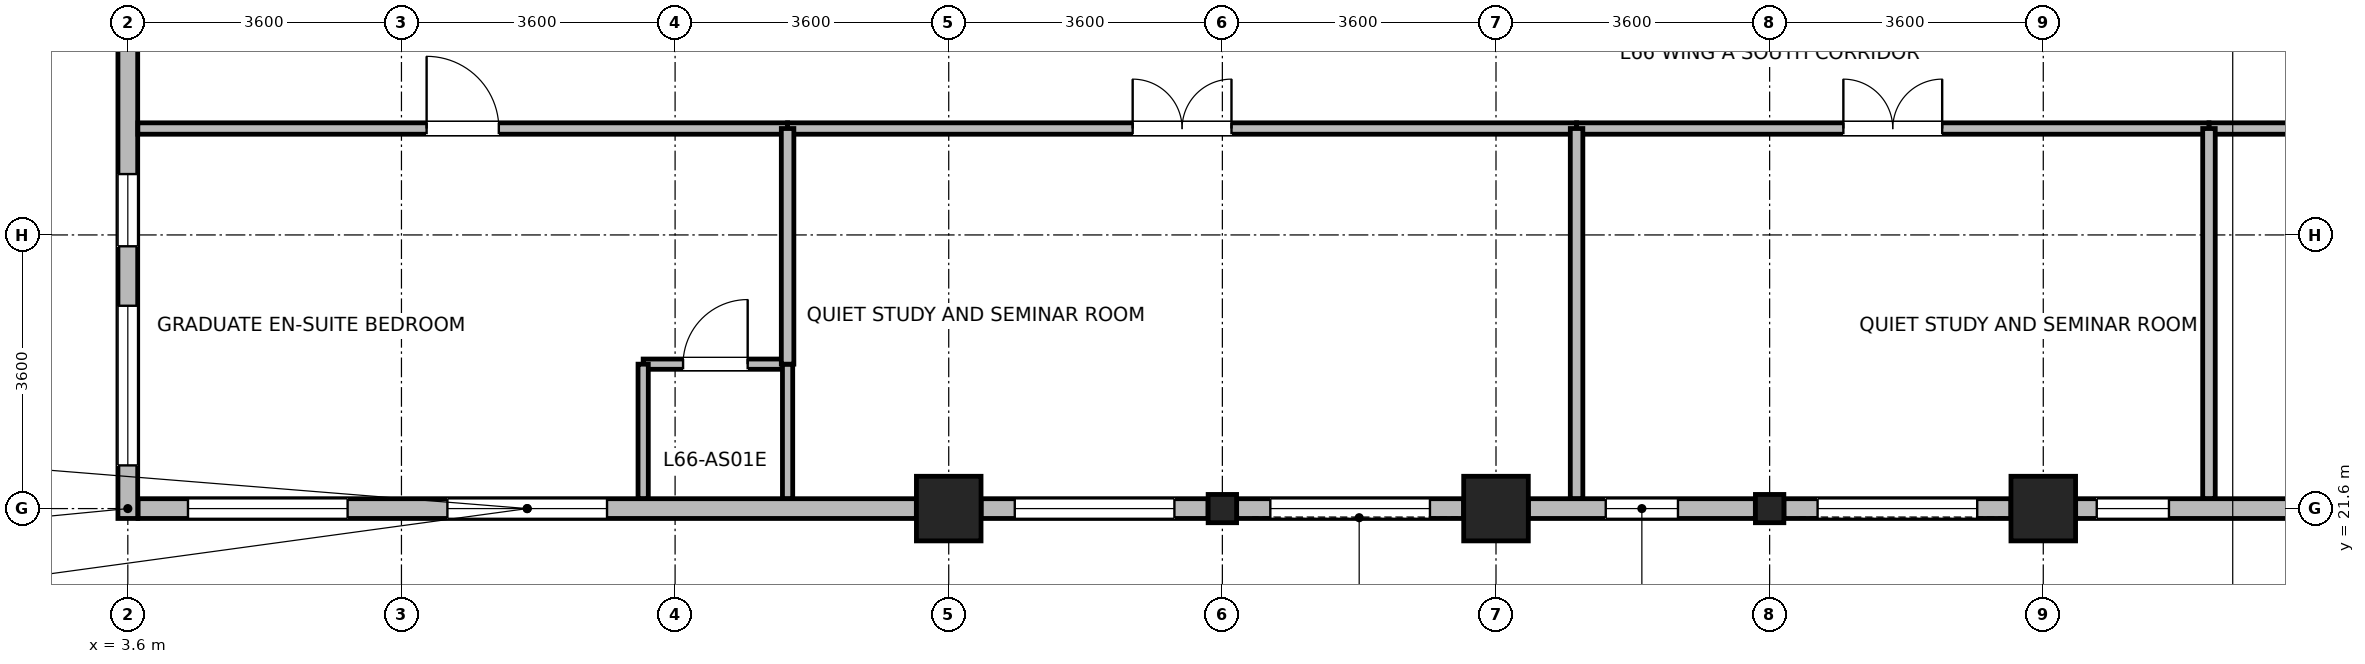
"""IFC4 building model, lengths in metres.
Left out: names, types, materials, properties, quantities, classifications, styles, units other than length and angle.
Written with IfcOpenShell. Run it as: python <this file> out.ifc"""

import sys

from ifc_helpers import new_model, si_unit, direction, frame, frame_2d, origin, origin_2d, place, context, subcontext, project, spatial, rectangle, i_section, extrude, source, transform, mapped, element, fill, save


model = new_model("IFC4")
c1 = context("Model", 3, precision=1e-05, world=origin(), true_north=direction((0.0, 1.0)))
c2 = subcontext(c1, "Body", "Model", "MODEL_VIEW")
j1 = project(units=[si_unit("LENGTHUNIT", "METRE"), si_unit("PLANEANGLEUNIT", "RADIAN")], contexts=[c1])
p1 = place(None, origin())
s1 = spatial("IfcSite", under=j1, at=p1, CompositionType="ELEMENT")
p2 = place(p1, origin())
s2 = spatial("IfcBuilding", under=s1, at=p2, CompositionType="ELEMENT")
p3 = place(p2, frame((0.0, 0.0, 257.3)))
s3 = spatial("IfcBuildingStorey", under=s2, at=p3, CompositionType="ELEMENT", Elevation=257.3)
m1 = source(origin(), c2, "Body", "SweptSolid", [
    extrude(rectangle(XDim=0.85, YDim=0.85, at=origin_2d()), origin(), (0.0, 0.0, 1.0), 3.7),
])
for number, where, z_axis, x_axis in (
    (1, (14.4, 21.6, 0.0), (0.0, 0.0, 1.0), (1.0, 0.0, 0.0)),
    (2, (21.6, 21.6, 0.0), (0.0, 0.0, 1.0), (1.0, 0.0, 0.0)),
    (3, (28.8, 21.6, 0.0), (0.0, 0.0, 1.0), (1.0, 0.0, 0.0)),
):
    element("IfcColumn", number, at=place(p3, frame(where, z_axis=z_axis, x_axis=x_axis)), inside=s3, PredefinedType="COLUMN", context=c2, shape_type="MappedRepresentation", body=[
        mapped(m1, transform((0.0, 0.0, 0.0), x_axis=(1.0, 0.0, 0.0), y_axis=(0.0, 1.0, 0.0), z_axis=(0.0, 0.0, 1.0), scale=1.0)),
    ])
m2 = source(origin(), c2, "Body", "SweptSolid", [
    extrude(i_section(OverallWidth=0.374, OverallDepth=0.372, WebThickness=0.015, FlangeThickness=0.026, FilletRadius=0.015, at=origin_2d()), origin(), (0.0, 0.0, 1.0), 3.7),
])
for number, where, z_axis, x_axis in (
    (4, (18.0, 21.6, 0.0), (0.0, 0.0, 1.0), (1.0, 0.0, 0.0)),
    (5, (25.2, 21.6, 0.0), (0.0, 0.0, 1.0), (1.0, 0.0, 0.0)),
):
    element("IfcColumn", number, at=place(p3, frame(where, z_axis=z_axis, x_axis=x_axis)), inside=s3, PredefinedType="COLUMN", context=c2, shape_type="MappedRepresentation", body=[
        mapped(m2, transform((0.0, 0.0, 0.0), x_axis=(1.0, 0.0, 0.0), y_axis=(0.0, 1.0, 0.0), z_axis=(0.0, 0.0, 1.0), scale=1.0)),
    ])
p4 = place(p3, frame((13.974, 21.6, 0.0), z_axis=(0.0, 0.0, 1.0), x_axis=(-1.0, 0.0, 0.0)))
e6 = element("IfcWall", 6, at=p4, inside=s3, PredefinedType="STANDARD", context=c2, shape_type="SweptSolid", body=[
    extrude(rectangle(XDim=10.239, YDim=0.26, at=frame_2d((5.12, 0.0))), origin(), (0.0, 0.0, 1.0), 3.455),
])
p5 = place(p4, frame((4.07, 0.0, 0.85)))
e7 = element("IfcOpeningElement", 7, at=p5, cuts=e6, PredefinedType="OPENING", context=c2, shape_type="SweptSolid", body=[
    extrude(rectangle(XDim=2.1, YDim=1.95, at=frame_2d((1.05, 0.975))), frame((0.0, 0.14, 0.0), z_axis=(0.0, -1.0, 0.0), x_axis=(1.0, 0.0, 0.0)), (0.0, 0.0, 1.0), 0.28),
])
p6 = place(p4, frame((7.482, 0.0, 0.85)))
e8 = element("IfcOpeningElement", 8, at=p6, cuts=e6, PredefinedType="OPENING", context=c2, shape_type="SweptSolid", body=[
    extrude(rectangle(XDim=2.1, YDim=1.95, at=frame_2d((1.05, 0.975))), frame((0.0, 0.14, 0.0), z_axis=(0.0, -1.0, 0.0), x_axis=(1.0, 0.0, 0.0)), (0.0, 0.0, 1.0), 0.28),
])
p7 = place(p3, frame((17.812, 21.6, 0.0), z_axis=(0.0, 0.0, 1.0), x_axis=(-1.0, 0.0, 0.0)))
e9 = element("IfcWall", 9, at=p7, inside=s3, PredefinedType="STANDARD", context=c2, shape_type="SweptSolid", body=[
    extrude(rectangle(XDim=2.986, YDim=0.26, at=frame_2d((1.493, 0.0))), origin(), (0.0, 0.0, 1.0), 3.055),
])
p8 = place(p7, frame((0.443, 0.0, 0.85)))
e10 = element("IfcOpeningElement", 10, at=p8, cuts=e9, PredefinedType="OPENING", context=c2, shape_type="SweptSolid", body=[
    extrude(rectangle(XDim=2.1, YDim=1.95, at=frame_2d((1.05, 0.975))), frame((0.0, 0.14, 0.0), z_axis=(0.0, -1.0, 0.0), x_axis=(1.0, 0.0, 0.0)), (0.0, 0.0, 1.0), 0.28),
])
p9 = place(p3, frame((21.174, 21.6, 0.0), z_axis=(0.0, 0.0, 1.0), x_axis=(-1.0, 0.0, 0.0)))
e11 = element("IfcWall", 11, at=p9, inside=s3, PredefinedType="STANDARD", context=c2, shape_type="SweptSolid", body=[
    extrude(rectangle(XDim=2.986, YDim=0.26, at=frame_2d((1.493, 0.0))), origin(), (0.0, 0.0, 1.0), 3.055),
])
p10 = place(p9, frame((0.443, 0.0, 0.85)))
e12 = element("IfcOpeningElement", 12, at=p10, cuts=e11, PredefinedType="OPENING", context=c2, shape_type="SweptSolid", body=[
    extrude(rectangle(XDim=2.1, YDim=1.95, at=frame_2d((1.05, 0.975))), frame((0.0, 0.14, 0.0), z_axis=(0.0, -1.0, 0.0), x_axis=(1.0, 0.0, 0.0)), (0.0, 0.0, 1.0), 0.28),
])
p11 = place(p3, frame((25.012, 21.6, 0.0), z_axis=(0.0, 0.0, 1.0), x_axis=(-1.0, 0.0, 0.0)))
e13 = element("IfcWall", 13, at=p11, inside=s3, PredefinedType="STANDARD", context=c2, shape_type="SweptSolid", body=[
    extrude(rectangle(XDim=2.986, YDim=0.26, at=frame_2d((1.493, 0.0))), origin(), (0.0, 0.0, 1.0), 3.055),
])
p12 = place(p11, frame((1.018, 0.0, 0.85)))
e14 = element("IfcOpeningElement", 14, at=p12, cuts=e13, PredefinedType="OPENING", context=c2, shape_type="SweptSolid", body=[
    extrude(rectangle(XDim=0.95, YDim=1.75, at=frame_2d((0.475, 0.875))), frame((0.0, 0.14, 0.0), z_axis=(0.0, -1.0, 0.0), x_axis=(1.0, 0.0, 0.0)), (0.0, 0.0, 1.0), 0.28),
])
p13 = place(p3, frame((28.374, 21.6, 0.0), z_axis=(0.0, 0.0, 1.0), x_axis=(-1.0, 0.0, 0.0)))
e15 = element("IfcWall", 15, at=p13, inside=s3, PredefinedType="STANDARD", context=c2, shape_type="SweptSolid", body=[
    extrude(rectangle(XDim=2.986, YDim=0.26, at=frame_2d((1.493, 0.0))), origin(), (0.0, 0.0, 1.0), 3.055),
])
p14 = place(p13, frame((0.443, 0.0, 0.85)))
e16 = element("IfcOpeningElement", 16, at=p14, cuts=e15, PredefinedType="OPENING", context=c2, shape_type="SweptSolid", body=[
    extrude(rectangle(XDim=2.1, YDim=1.95, at=frame_2d((1.05, 0.975))), frame((0.0, 0.14, 0.0), z_axis=(0.0, -1.0, 0.0), x_axis=(1.0, 0.0, 0.0)), (0.0, 0.0, 1.0), 0.28),
])
p15 = place(p3, frame((32.212, 21.6, 0.0), z_axis=(0.0, 0.0, 1.0), x_axis=(-1.0, 0.0, 0.0)))
e17 = element("IfcWall", 17, at=p15, inside=s3, PredefinedType="STANDARD", context=c2, shape_type="SweptSolid", body=[
    extrude(rectangle(XDim=2.986, YDim=0.26, at=frame_2d((1.493, 0.0))), origin(), (0.0, 0.0, 1.0), 3.055),
])
p16 = place(p15, frame((1.759, 0.0, 0.85)))
e18 = element("IfcOpeningElement", 18, at=p16, cuts=e17, PredefinedType="OPENING", context=c2, shape_type="SweptSolid", body=[
    extrude(rectangle(XDim=0.95, YDim=1.75, at=frame_2d((0.475, 0.875))), frame((0.0, 0.14, 0.0), z_axis=(0.0, -1.0, 0.0), x_axis=(1.0, 0.0, 0.0)), (0.0, 0.0, 1.0), 0.28),
])
p17 = place(p3, frame((3.6, 21.47, 0.0), z_axis=(0.0, 0.0, 1.0), x_axis=(0.0, 1.0, 0.0)))
e19 = element("IfcWall", 19, at=p17, inside=s3, PredefinedType="STANDARD", context=c2, shape_type="SweptSolid", body=[
    extrude(rectangle(XDim=6.993, YDim=0.26, at=frame_2d((3.497, 0.0))), origin(), (0.0, 0.0, 1.0), 3.455),
])
p18 = place(p17, frame((0.698, 0.0, 0.85)))
e20 = element("IfcOpeningElement", 20, at=p18, cuts=e19, PredefinedType="OPENING", context=c2, shape_type="SweptSolid", body=[
    extrude(rectangle(XDim=2.1, YDim=1.95, at=frame_2d((1.05, 0.975))), frame((0.0, 0.14, 0.0), z_axis=(0.0, -1.0, 0.0), x_axis=(1.0, 0.0, 0.0)), (0.0, 0.0, 1.0), 0.28),
])
p19 = place(p17, frame((3.581, 0.0, 0.85)))
e21 = element("IfcOpeningElement", 21, at=p19, cuts=e19, PredefinedType="OPENING", context=c2, shape_type="SweptSolid", body=[
    extrude(rectangle(XDim=0.95, YDim=1.75, at=frame_2d((0.475, 0.875))), frame((0.0, 0.14, 0.0), z_axis=(0.0, -1.0, 0.0), x_axis=(1.0, 0.0, 0.0)), (0.0, 0.0, 1.0), 0.28),
])
p20 = place(p3, frame((10.38, 23.5, 0.0), z_axis=(0.0, 0.0, 1.0), x_axis=(1.0, 0.0, 0.0)))
e22 = element("IfcWall", 22, at=p20, inside=s3, PredefinedType="PARTITIONING", context=c2, shape_type="SweptSolid", body=[
    extrude(rectangle(XDim=1.9, YDim=0.135, at=frame_2d((0.95, 0.0))), origin(), (0.0, 0.0, 1.0), 3.455),
])
p21 = place(p20, frame((0.525, 0.0, 0.0)))
e23 = element("IfcOpeningElement", 23, at=p21, cuts=e22, PredefinedType="OPENING", context=c2, shape_type="SweptSolid", body=[
    extrude(rectangle(XDim=0.85, YDim=2.04, at=frame_2d((0.425, 1.02))), frame((0.0, 0.078, 0.0), z_axis=(0.0, -1.0, 0.0), x_axis=(1.0, 0.0, 0.0)), (0.0, 0.0, 1.0), 0.155),
])
for number, where, z_axis, x_axis in (
    (24, (10.38, 21.732, 0.0), (0.0, 0.0, 1.0), (0.0, 1.0, 0.0)),
    (25, (12.28, 21.732, 0.0), (0.0, 0.0, 1.0), (0.0, 1.0, 0.0)),
):
    element("IfcWall", number, at=place(p3, frame(where, z_axis=z_axis, x_axis=x_axis)), inside=s3, PredefinedType="PARTITIONING", context=c2, shape_type="SweptSolid", body=[
        extrude(rectangle(XDim=1.768, YDim=0.135, at=frame_2d((0.884, 0.0))), origin(), (0.0, 0.0, 1.0), 3.455),
    ])
p22 = place(p3, frame((30.98, 26.6, 0.0), z_axis=(0.0, 0.0, 1.0), x_axis=(1.0, 0.0, 0.0)))
e26 = element("IfcWall", 26, at=p22, inside=s3, PredefinedType="PARTITIONING", context=c2, shape_type="SweptSolid", body=[
    extrude(rectangle(XDim=15.8, YDim=0.15, at=frame_2d((7.9, 0.0))), origin(), (0.0, 0.0, 1.0), 3.455),
])
p23 = place(p22, frame((7.25, 0.0, 0.0)))
e27 = element("IfcOpeningElement", 27, at=p23, cuts=e26, PredefinedType="OPENING", context=c2, shape_type="SweptSolid", body=[
    extrude(rectangle(XDim=1.3, YDim=2.12, at=frame_2d((0.65, 1.06))), frame((0.0, 0.085, 0.0), z_axis=(0.0, -1.0, 0.0), x_axis=(1.0, 0.0, 0.0)), (0.0, 0.0, 1.0), 0.17),
])
p24 = place(p3, frame((12.28, 26.6, 0.0), z_axis=(0.0, 0.0, 1.0), x_axis=(1.0, 0.0, 0.0)))
e28 = element("IfcWall", 28, at=p24, inside=s3, PredefinedType="PARTITIONING", context=c2, shape_type="SweptSolid", body=[
    extrude(rectangle(XDim=10.38, YDim=0.15, at=frame_2d((5.19, 0.0))), origin(), (0.0, 0.0, 1.0), 3.455),
])
p25 = place(p24, frame((4.54, 0.0, 0.0)))
e29 = element("IfcOpeningElement", 29, at=p25, cuts=e28, PredefinedType="OPENING", context=c2, shape_type="SweptSolid", body=[
    extrude(rectangle(XDim=1.3, YDim=2.12, at=frame_2d((0.65, 1.06))), frame((0.0, 0.085, 0.0), z_axis=(0.0, -1.0, 0.0), x_axis=(1.0, 0.0, 0.0)), (0.0, 0.0, 1.0), 0.17),
])
p26 = place(p3, frame((3.732, 26.6, 0.0), z_axis=(0.0, 0.0, 1.0), x_axis=(1.0, 0.0, 0.0)))
e30 = element("IfcWall", 30, at=p26, inside=s3, PredefinedType="PARTITIONING", context=c2, shape_type="SweptSolid", body=[
    extrude(rectangle(XDim=8.548, YDim=0.15, at=frame_2d((4.274, 0.0))), origin(), (0.0, 0.0, 1.0), 3.455),
])
p27 = place(p26, frame((3.799, 0.0, 0.0)))
e31 = element("IfcOpeningElement", 31, at=p27, cuts=e30, PredefinedType="OPENING", context=c2, shape_type="SweptSolid", body=[
    extrude(rectangle(XDim=0.95, YDim=2.1, at=frame_2d((0.475, 1.05))), frame((0.0, 0.085, 0.0), z_axis=(0.0, -1.0, 0.0), x_axis=(1.0, 0.0, 0.0)), (0.0, 0.0, 1.0), 0.17),
])
p28 = place(p3, frame((22.66, 26.6, 0.0), z_axis=(0.0, 0.0, 1.0), x_axis=(1.0, 0.0, 0.0)))
e32 = element("IfcWall", 32, at=p28, inside=s3, PredefinedType="PARTITIONING", context=c2, shape_type="SweptSolid", body=[
    extrude(rectangle(XDim=8.32, YDim=0.15, at=frame_2d((4.16, 0.0))), origin(), (0.0, 0.0, 1.0), 3.455),
])
p29 = place(p28, frame((3.51, 0.0, 0.0)))
e33 = element("IfcOpeningElement", 33, at=p29, cuts=e32, PredefinedType="OPENING", context=c2, shape_type="SweptSolid", body=[
    extrude(rectangle(XDim=1.3, YDim=2.12, at=frame_2d((0.65, 1.06))), frame((0.0, 0.085, 0.0), z_axis=(0.0, -1.0, 0.0), x_axis=(1.0, 0.0, 0.0)), (0.0, 0.0, 1.0), 0.17),
])
for number, where, z_axis, x_axis in (
    (34, (22.66, 21.732, 0.0), (0.0, 0.0, 1.0), (0.0, 1.0, 0.0)),
    (35, (30.98, 21.732, 0.0), (0.0, 0.0, 1.0), (0.0, 1.0, 0.0)),
):
    element("IfcWall", number, at=place(p3, frame(where, z_axis=z_axis, x_axis=x_axis)), inside=s3, PredefinedType="PARTITIONING", context=c2, shape_type="SweptSolid", body=[
        extrude(rectangle(XDim=4.868, YDim=0.165, at=frame_2d((2.434, 0.0))), origin(), (0.0, 0.0, 1.0), 3.455),
    ])
p30 = place(p3, frame((12.28, 23.5, 0.0), z_axis=(0.0, 0.0, 1.0), x_axis=(0.0, 1.0, 0.0)))
e36 = element("IfcWall", 36, at=p30, inside=s3, PredefinedType="PARTITIONING", context=c2, shape_type="SweptSolid", body=[
    extrude(rectangle(XDim=3.1, YDim=0.165, at=frame_2d((1.55, 0.0))), origin(), (0.0, 0.0, 1.0), 3.455),
])
p31 = place(p5, origin())
e37 = element("IfcWindow", 37, at=p31, inside=s3, PartitioningType="SINGLE_PANEL", PredefinedType="WINDOW", context=c2, shape_type="SweptSolid", body=[
    extrude(rectangle(XDim=2.1, YDim=1.95, at=frame_2d((1.05, 0.975))), frame((0.0, 0.03, 0.0), z_axis=(0.0, -1.0, 0.0), x_axis=(1.0, 0.0, 0.0)), (0.0, 0.0, 1.0), 0.06),
])
fill(e7, e37)
p32 = place(p6, origin())
e38 = element("IfcWindow", 38, at=p32, inside=s3, PartitioningType="SINGLE_PANEL", PredefinedType="WINDOW", context=c2, shape_type="SweptSolid", body=[
    extrude(rectangle(XDim=2.1, YDim=1.95, at=frame_2d((1.05, 0.975))), frame((0.0, 0.03, 0.0), z_axis=(0.0, -1.0, 0.0), x_axis=(1.0, 0.0, 0.0)), (0.0, 0.0, 1.0), 0.06),
])
fill(e8, e38)
p33 = place(p8, origin())
e39 = element("IfcWindow", 39, at=p33, inside=s3, PartitioningType="SINGLE_PANEL", PredefinedType="WINDOW", context=c2, shape_type="SweptSolid", body=[
    extrude(rectangle(XDim=2.1, YDim=1.95, at=frame_2d((1.05, 0.975))), frame((0.0, 0.03, 0.0), z_axis=(0.0, -1.0, 0.0), x_axis=(1.0, 0.0, 0.0)), (0.0, 0.0, 1.0), 0.06),
])
fill(e10, e39)
p34 = place(p10, origin())
e40 = element("IfcWindow", 40, at=p34, inside=s3, PartitioningType="SINGLE_PANEL", PredefinedType="WINDOW", context=c2, shape_type="SweptSolid", body=[
    extrude(rectangle(XDim=2.1, YDim=1.95, at=frame_2d((1.05, 0.975))), frame((0.0, 0.03, 0.0), z_axis=(0.0, -1.0, 0.0), x_axis=(1.0, 0.0, 0.0)), (0.0, 0.0, 1.0), 0.06),
])
fill(e12, e40)
p35 = place(p12, origin())
e41 = element("IfcWindow", 41, at=p35, inside=s3, PartitioningType="SINGLE_PANEL", PredefinedType="WINDOW", context=c2, shape_type="SweptSolid", body=[
    extrude(rectangle(XDim=0.95, YDim=1.75, at=frame_2d((0.475, 0.875))), frame((0.0, 0.03, 0.0), z_axis=(0.0, -1.0, 0.0), x_axis=(1.0, 0.0, 0.0)), (0.0, 0.0, 1.0), 0.06),
])
fill(e14, e41)
p36 = place(p14, origin())
e42 = element("IfcWindow", 42, at=p36, inside=s3, PartitioningType="SINGLE_PANEL", PredefinedType="WINDOW", context=c2, shape_type="SweptSolid", body=[
    extrude(rectangle(XDim=2.1, YDim=1.95, at=frame_2d((1.05, 0.975))), frame((0.0, 0.03, 0.0), z_axis=(0.0, -1.0, 0.0), x_axis=(1.0, 0.0, 0.0)), (0.0, 0.0, 1.0), 0.06),
])
fill(e16, e42)
p37 = place(p16, origin())
e43 = element("IfcWindow", 43, at=p37, inside=s3, PartitioningType="SINGLE_PANEL", PredefinedType="WINDOW", context=c2, shape_type="SweptSolid", body=[
    extrude(rectangle(XDim=0.95, YDim=1.75, at=frame_2d((0.475, 0.875))), frame((0.0, 0.03, 0.0), z_axis=(0.0, -1.0, 0.0), x_axis=(1.0, 0.0, 0.0)), (0.0, 0.0, 1.0), 0.06),
])
fill(e18, e43)
p38 = place(p18, origin())
e44 = element("IfcWindow", 44, at=p38, inside=s3, PartitioningType="SINGLE_PANEL", PredefinedType="WINDOW", context=c2, shape_type="SweptSolid", body=[
    extrude(rectangle(XDim=2.1, YDim=1.95, at=frame_2d((1.05, 0.975))), frame((0.0, 0.03, 0.0), z_axis=(0.0, -1.0, 0.0), x_axis=(1.0, 0.0, 0.0)), (0.0, 0.0, 1.0), 0.06),
])
fill(e20, e44)
p39 = place(p19, origin())
e45 = element("IfcWindow", 45, at=p39, inside=s3, PartitioningType="SINGLE_PANEL", PredefinedType="WINDOW", context=c2, shape_type="SweptSolid", body=[
    extrude(rectangle(XDim=0.95, YDim=1.75, at=frame_2d((0.475, 0.875))), frame((0.0, 0.03, 0.0), z_axis=(0.0, -1.0, 0.0), x_axis=(1.0, 0.0, 0.0)), (0.0, 0.0, 1.0), 0.06),
])
fill(e21, e45)
p40 = place(p21, origin())
e46 = element("IfcDoor", 46, at=p40, inside=s3, OperationType="SINGLE_SWING_RIGHT", PredefinedType="DOOR", context=c2, shape_type="SweptSolid", body=[
    extrude(rectangle(XDim=0.85, YDim=2.04, at=frame_2d((0.425, 1.02))), frame((0.0, 0.025, 0.0), z_axis=(0.0, -1.0, 0.0), x_axis=(1.0, 0.0, 0.0)), (0.0, 0.0, 1.0), 0.05),
])
fill(e23, e46)
p41 = place(p25, origin())
e47 = element("IfcDoor", 47, at=p41, inside=s3, OperationType="DOUBLE_DOOR_SINGLE_SWING", PredefinedType="DOOR", context=c2, shape_type="SweptSolid", body=[
    extrude(rectangle(XDim=1.3, YDim=2.12, at=frame_2d((0.65, 1.06))), frame((0.0, 0.025, 0.0), z_axis=(0.0, -1.0, 0.0), x_axis=(1.0, 0.0, 0.0)), (0.0, 0.0, 1.0), 0.05),
])
fill(e29, e47)
p42 = place(p27, origin())
e48 = element("IfcDoor", 48, at=p42, inside=s3, OperationType="SINGLE_SWING_LEFT", PredefinedType="DOOR", context=c2, shape_type="SweptSolid", body=[
    extrude(rectangle(XDim=0.95, YDim=2.1, at=frame_2d((0.475, 1.05))), frame((0.0, 0.025, 0.0), z_axis=(0.0, -1.0, 0.0), x_axis=(1.0, 0.0, 0.0)), (0.0, 0.0, 1.0), 0.05),
])
fill(e31, e48)
p43 = place(p29, origin())
e49 = element("IfcDoor", 49, at=p43, inside=s3, OperationType="DOUBLE_DOOR_SINGLE_SWING", PredefinedType="DOOR", context=c2, shape_type="SweptSolid", body=[
    extrude(rectangle(XDim=1.3, YDim=2.12, at=frame_2d((0.65, 1.06))), frame((0.0, 0.025, 0.0), z_axis=(0.0, -1.0, 0.0), x_axis=(1.0, 0.0, 0.0)), (0.0, 0.0, 1.0), 0.05),
])
fill(e33, e49)
save(model, sys.argv[1])
